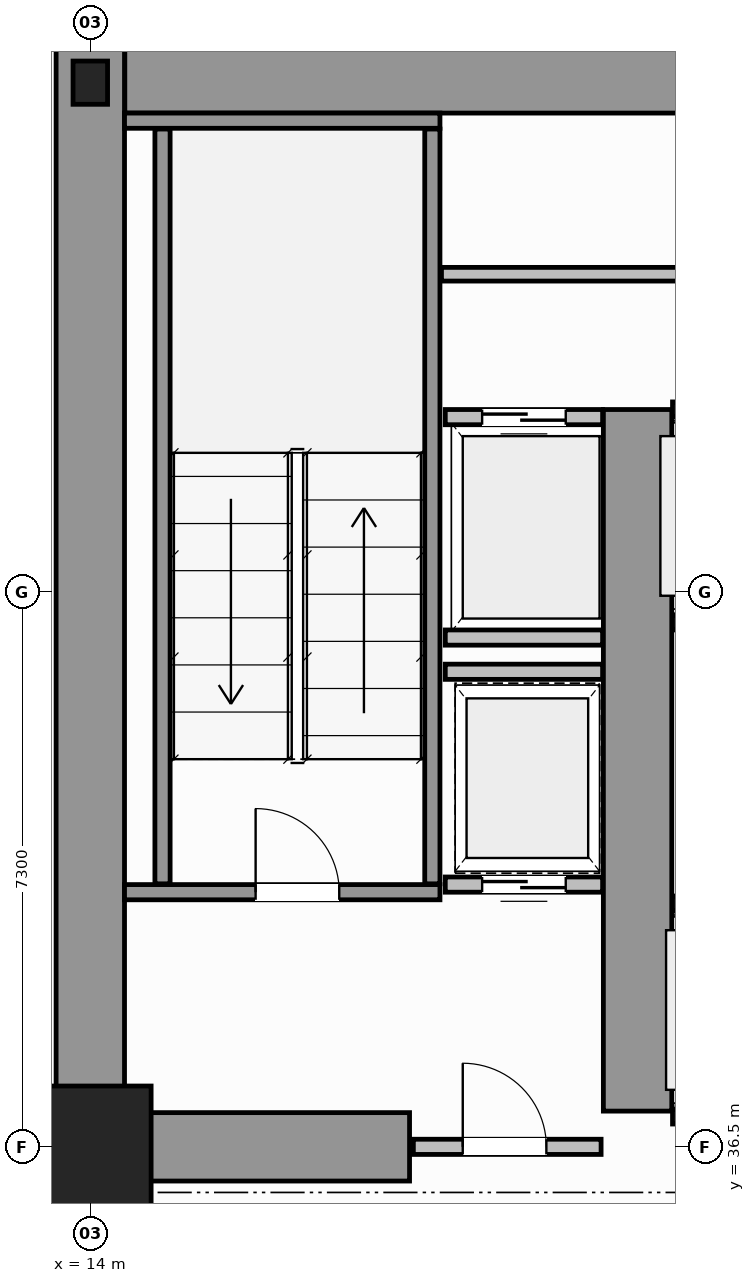
"""IFC4 building model, lengths in metres.
Left out: names, types, materials, properties, quantities, classifications, styles, units other than length and angle.
Written with IfcOpenShell. Run it as: python <this file> out.ifc"""

import sys

from ifc_helpers import new_model, si_unit, direction, frame, frame_2d, origin, origin_2d, place, context, subcontext, project, spatial, rectangle, i_section, extrude, source, transform, mapped, element, fill, save


model = new_model("IFC4")
c1 = context("Model", 3, precision=1e-05, world=origin(), true_north=direction((0.0, 1.0)))
c2 = subcontext(c1, "Body", "Model", "MODEL_VIEW")
j1 = project(units=[si_unit("LENGTHUNIT", "METRE"), si_unit("PLANEANGLEUNIT", "RADIAN")], contexts=[c1])
p1 = place(None, origin())
s1 = spatial("IfcSite", under=j1, at=p1, CompositionType="ELEMENT")
p2 = place(p1, origin())
s2 = spatial("IfcBuilding", under=s1, at=p2, CompositionType="ELEMENT")
p3 = place(p2, frame((0.0, 0.0, 10.0)))
s3 = spatial("IfcBuildingStorey", under=s2, at=p3, CompositionType="ELEMENT", Elevation=10.0)
m1 = source(origin(), c2, "Body", "SweptSolid", [
    extrude(rectangle(XDim=1.6, YDim=1.6, at=origin_2d()), origin(), (0.0, 0.0, 1.0), 4.4),
])
p4 = place(p3, frame((14.0, 36.5, 0.0), z_axis=(0.0, 0.0, 1.0), x_axis=(1.0, 0.0, 0.0)))
e1 = element("IfcColumn", 1, at=p4, inside=s3, PredefinedType="COLUMN", context=c2, shape_type="MappedRepresentation", body=[
    mapped(m1, transform((0.0, 0.0, 0.0), scale=1.0)),
])
m2 = source(origin(), c2, "Body", "SweptSolid", [
    extrude(i_section(OverallWidth=0.454, OverallDepth=0.569, WebThickness=0.078, FlangeThickness=0.08, FilletRadius=0.015, at=origin_2d()), origin(), (0.0, 0.0, 1.0), 4.4),
])
p5 = place(p3, frame((14.0, 50.5, 0.0), z_axis=(0.0, 0.0, 1.0), x_axis=(1.0, 0.0, 0.0)))
e2 = element("IfcColumn", 2, at=p5, inside=s3, PredefinedType="COLUMN", context=c2, shape_type="MappedRepresentation", body=[
    mapped(m2, transform((0.0, 0.0, 0.0), scale=1.0)),
])
p6 = place(p3, frame((14.454, 50.55, 0.0), z_axis=(0.0, 0.0, 1.0), x_axis=(1.0, 0.0, 0.0)))
e3 = element("IfcWall", 3, at=p6, inside=s3, PredefinedType="SHEAR", context=c2, shape_type="SweptSolid", body=[
    extrude(rectangle(XDim=19.544, YDim=0.9, at=frame_2d((9.772, 0.0))), origin(), (0.0, 0.0, 1.0), 4.4),
])
p7 = place(p3, frame((14.0, 36.5, 0.0), z_axis=(0.0, 0.0, 1.0), x_axis=(0.0, 1.0, 0.0)))
e4 = element("IfcWall", 4, at=p7, inside=s3, PredefinedType="SHEAR", context=c2, shape_type="SweptSolid", body=[
    extrude(rectangle(XDim=14.5, YDim=0.9, at=frame_2d((7.25, 0.0))), origin(), (0.0, 0.0, 1.0), 4.4),
])
p8 = place(p3, frame((14.47, 36.5, 0.0), z_axis=(0.0, 0.0, 1.0), x_axis=(1.0, 0.0, 0.0)))
e5 = element("IfcWall", 5, at=p8, inside=s3, PredefinedType="SHEAR", context=c2, shape_type="SweptSolid", body=[
    extrude(rectangle(XDim=3.73, YDim=0.9, at=frame_2d((1.865, 0.0))), origin(), (0.0, 0.0, 1.0), 2.92),
])
p9 = place(p3, frame((21.2, 36.97, 0.0), z_axis=(0.0, 0.0, 1.0), x_axis=(0.0, 1.0, 0.0)))
e6 = element("IfcWall", 6, at=p9, inside=s3, PredefinedType="SHEAR", context=c2, shape_type="SweptSolid", body=[
    extrude(rectangle(XDim=9.23, YDim=0.9, at=frame_2d((4.615, 0.0))), origin(), (0.0, 0.0, 1.0), 4.4),
])
p10 = place(p3, frame((14.45, 39.85, 0.0), z_axis=(0.0, 0.0, 1.0), x_axis=(1.0, 0.0, 0.0)))
e7 = element("IfcWall", 7, at=p10, inside=s3, PredefinedType="SOLIDWALL", context=c2, shape_type="SweptSolid", body=[
    extrude(rectangle(XDim=4.15, YDim=0.2, at=frame_2d((2.075, 0.0))), origin(), (0.0, 0.0, 1.0), 4.4),
])
p11 = place(p10, frame((1.725, 0.0, 0.0)))
e8 = element("IfcOpeningElement", 8, at=p11, cuts=e7, PredefinedType="OPENING", context=c2, shape_type="SweptSolid", body=[
    extrude(rectangle(XDim=1.1, YDim=2.15, at=frame_2d((0.55, 1.075))), frame((0.0, 0.11, 0.0), z_axis=(0.0, -1.0, 0.0), x_axis=(1.0, 0.0, 0.0)), (0.0, 0.0, 1.0), 0.22),
])
p12 = place(p3, frame((14.45, 50.0, 0.0), z_axis=(0.0, 0.0, 1.0), x_axis=(1.0, 0.0, 0.0)))
e9 = element("IfcWall", 9, at=p12, inside=s3, PredefinedType="SOLIDWALL", context=c2, shape_type="SweptSolid", body=[
    extrude(rectangle(XDim=4.15, YDim=0.2, at=frame_2d((2.075, 0.0))), origin(), (0.0, 0.0, 1.0), 4.4),
])
for number, where, z_axis, x_axis in (
    (10, (14.95, 39.96, 0.0), (0.0, 0.0, 1.0), (0.0, 1.0, 0.0)),
    (11, (18.5, 39.96, 0.0), (0.0, 0.0, 1.0), (0.0, 1.0, 0.0)),
):
    element("IfcWall", number, at=place(p3, frame(where, z_axis=z_axis, x_axis=x_axis)), inside=s3, PredefinedType="SOLIDWALL", context=c2, shape_type="SweptSolid", body=[
        extrude(rectangle(XDim=9.93, YDim=0.2, at=frame_2d((4.965, 0.0))), origin(), (0.0, 0.0, 1.0), 4.4),
    ])
p13 = place(p3, frame((18.25, 36.5, 0.0), z_axis=(0.0, 0.0, 1.0), x_axis=(1.0, 0.0, 0.0)))
e12 = element("IfcWall", 12, at=p13, inside=s3, PredefinedType="SOLIDWALL", context=c2, shape_type="SweptSolid", body=[
    extrude(rectangle(XDim=2.47, YDim=0.2, at=frame_2d((1.235, 0.0))), origin(), (0.0, 0.0, 1.0), 2.91),
])
p14 = place(p13, frame((0.65, 0.0, 0.0)))
e13 = element("IfcOpeningElement", 13, at=p14, cuts=e12, PredefinedType="OPENING", context=c2, shape_type="SweptSolid", body=[
    extrude(rectangle(XDim=1.1, YDim=2.15, at=frame_2d((0.55, 1.075))), frame((0.0, 0.11, 0.0), z_axis=(0.0, -1.0, 0.0), x_axis=(1.0, 0.0, 0.0)), (0.0, 0.0, 1.0), 0.22),
])
p15 = place(p3, frame((21.66, 39.7, 0.0), z_axis=(0.0, 0.0, 1.0), x_axis=(1.0, 0.0, 0.0)))
e14 = element("IfcWall", 14, at=p15, inside=s3, PredefinedType="SOLIDWALL", context=c2, shape_type="SweptSolid", body=[
    extrude(rectangle(XDim=1.77, YDim=0.2, at=frame_2d((0.885, 0.0))), origin(), (0.0, 0.0, 1.0), 4.12),
])
p16 = place(p15, frame((0.335, 0.0, 0.0)))
e15 = element("IfcOpeningElement", 15, at=p16, cuts=e14, PredefinedType="OPENING", context=c2, shape_type="SweptSolid", body=[
    extrude(rectangle(XDim=1.1, YDim=2.15, at=frame_2d((0.55, 1.075))), frame((0.0, 0.11, 0.0), z_axis=(0.0, -1.0, 0.0), x_axis=(1.0, 0.0, 0.0)), (0.0, 0.0, 1.0), 0.22),
])
p17 = place(p3, frame((21.66, 36.9, 0.0), z_axis=(0.0, 0.0, 1.0), x_axis=(1.0, 0.0, 0.0)))
e16 = element("IfcWall", 16, at=p17, inside=s3, PredefinedType="SOLIDWALL", context=c2, shape_type="SweptSolid", body=[
    extrude(rectangle(XDim=1.77, YDim=0.2, at=frame_2d((0.885, 0.0))), origin(), (0.0, 0.0, 1.0), 2.91),
])
p18 = place(p3, frame((21.66, 43.4, 0.0), z_axis=(0.0, 0.0, 1.0), x_axis=(1.0, 0.0, 0.0)))
e17 = element("IfcWall", 17, at=p18, inside=s3, PredefinedType="SOLIDWALL", context=c2, shape_type="SweptSolid", body=[
    extrude(rectangle(XDim=1.65, YDim=0.2, at=frame_2d((0.825, 0.0))), origin(), (0.0, 0.0, 1.0), 4.12),
])
p19 = place(p18, frame((0.275, 0.0, 0.0)))
e18 = element("IfcOpeningElement", 18, at=p19, cuts=e17, PredefinedType="OPENING", context=c2, shape_type="SweptSolid", body=[
    extrude(rectangle(XDim=1.1, YDim=2.15, at=frame_2d((0.55, 1.075))), frame((0.0, 0.11, 0.0), z_axis=(0.0, -1.0, 0.0), x_axis=(1.0, 0.0, 0.0)), (0.0, 0.0, 1.0), 0.22),
])
p20 = place(p3, frame((21.66, 46.2, 0.0), z_axis=(0.0, 0.0, 1.0), x_axis=(1.0, 0.0, 0.0)))
e19 = element("IfcWall", 19, at=p20, inside=s3, PredefinedType="SOLIDWALL", context=c2, shape_type="SweptSolid", body=[
    extrude(rectangle(XDim=1.65, YDim=0.2, at=frame_2d((0.825, 0.0))), origin(), (0.0, 0.0, 1.0), 4.12),
])
p21 = place(p3, frame((18.67, 46.1, 0.0), z_axis=(0.0, 0.0, 1.0), x_axis=(1.0, 0.0, 0.0)))
e20 = element("IfcWall", 20, at=p21, inside=s3, PredefinedType="SOLIDWALL", context=c2, shape_type="SweptSolid", body=[
    extrude(rectangle(XDim=2.07, YDim=0.2, at=frame_2d((1.035, 0.0))), origin(), (0.0, 0.0, 1.0), 4.12),
])
p22 = place(p21, frame((0.485, 0.0, 0.0)))
e21 = element("IfcOpeningElement", 21, at=p22, cuts=e20, PredefinedType="OPENING", context=c2, shape_type="SweptSolid", body=[
    extrude(rectangle(XDim=1.1, YDim=2.15, at=frame_2d((0.55, 1.075))), frame((0.0, 0.11, 0.0), z_axis=(0.0, -1.0, 0.0), x_axis=(1.0, 0.0, 0.0)), (0.0, 0.0, 1.0), 0.22),
])
p23 = place(p3, frame((18.67, 43.2, 0.0), z_axis=(0.0, 0.0, 1.0), x_axis=(1.0, 0.0, 0.0)))
e22 = element("IfcWall", 22, at=p23, inside=s3, PredefinedType="SOLIDWALL", context=c2, shape_type="SweptSolid", body=[
    extrude(rectangle(XDim=2.07, YDim=0.2, at=frame_2d((1.035, 0.0))), origin(), (0.0, 0.0, 1.0), 4.12),
])
p24 = place(p3, frame((18.67, 39.95, 0.0), z_axis=(0.0, 0.0, 1.0), x_axis=(1.0, 0.0, 0.0)))
e23 = element("IfcWall", 23, at=p24, inside=s3, PredefinedType="SOLIDWALL", context=c2, shape_type="SweptSolid", body=[
    extrude(rectangle(XDim=2.07, YDim=0.2, at=frame_2d((1.035, 0.0))), origin(), (0.0, 0.0, 1.0), 4.12),
])
p25 = place(p24, frame((0.485, 0.0, 0.0)))
e24 = element("IfcOpeningElement", 24, at=p25, cuts=e23, PredefinedType="OPENING", context=c2, shape_type="SweptSolid", body=[
    extrude(rectangle(XDim=1.1, YDim=2.15, at=frame_2d((0.55, 1.075))), frame((0.0, 0.11, 0.0), z_axis=(0.0, -1.0, 0.0), x_axis=(1.0, 0.0, 0.0)), (0.0, 0.0, 1.0), 0.22),
])
p26 = place(p3, frame((18.67, 42.75, 0.0), z_axis=(0.0, 0.0, 1.0), x_axis=(1.0, 0.0, 0.0)))
e25 = element("IfcWall", 25, at=p26, inside=s3, PredefinedType="SOLIDWALL", context=c2, shape_type="SweptSolid", body=[
    extrude(rectangle(XDim=2.07, YDim=0.2, at=frame_2d((1.035, 0.0))), origin(), (0.0, 0.0, 1.0), 4.12),
])
p27 = place(p3, frame((18.62, 47.98, 0.0), z_axis=(0.0, 0.0, 1.0), x_axis=(1.0, 0.0, 0.0)))
e26 = element("IfcWall", 26, at=p27, inside=s3, PredefinedType="PLUMBINGWALL", context=c2, shape_type="SweptSolid", body=[
    extrude(rectangle(XDim=20.06, YDim=0.18, at=frame_2d((10.03, 0.0))), origin(), (0.0, 0.0, 1.0), 4.12),
])
p28 = place(p27, frame((3.5, 0.0, 0.0)))
e27 = element("IfcOpeningElement", 27, at=p28, cuts=e26, PredefinedType="OPENING", context=c2, shape_type="SweptSolid", body=[
    extrude(rectangle(XDim=0.9, YDim=2.15, at=frame_2d((0.45, 1.075))), frame((0.0, 0.1, 0.0), z_axis=(0.0, -1.0, 0.0), x_axis=(1.0, 0.0, 0.0)), (0.0, 0.0, 1.0), 0.2),
])
p29 = place(p27, frame((10.8, 0.0, 0.0)))
e28 = element("IfcOpeningElement", 28, at=p29, cuts=e26, PredefinedType="OPENING", context=c2, shape_type="SweptSolid", body=[
    extrude(rectangle(XDim=0.9, YDim=2.15, at=frame_2d((0.45, 1.075))), frame((0.0, 0.1, 0.0), z_axis=(0.0, -1.0, 0.0), x_axis=(1.0, 0.0, 0.0)), (0.0, 0.0, 1.0), 0.2),
])
p30 = place(p27, frame((16.8, 0.0, 0.0)))
e29 = element("IfcOpeningElement", 29, at=p30, cuts=e26, PredefinedType="OPENING", context=c2, shape_type="SweptSolid", body=[
    extrude(rectangle(XDim=0.9, YDim=2.15, at=frame_2d((0.45, 1.075))), frame((0.0, 0.1, 0.0), z_axis=(0.0, -1.0, 0.0), x_axis=(1.0, 0.0, 0.0)), (0.0, 0.0, 1.0), 0.2),
])
m3 = source(origin(), c2, "Body", "SweptSolid", [
    extrude(rectangle(XDim=1.1, YDim=2.15, at=frame_2d((0.55, 1.075))), frame((0.0, 0.025, 0.0), z_axis=(0.0, -1.0, 0.0), x_axis=(1.0, 0.0, 0.0)), (0.0, 0.0, 1.0), 0.05),
])
p31 = place(p11, origin())
e30 = element("IfcDoor", 30, at=p31, inside=s3, OperationType="SINGLE_SWING_LEFT", PredefinedType="DOOR", context=c2, shape_type="MappedRepresentation", body=[
    mapped(m3, transform((0.0, 0.0, 0.0), scale=1.0)),
])
fill(e8, e30)
p32 = place(p14, origin())
e31 = element("IfcDoor", 31, at=p32, inside=s3, OperationType="SINGLE_SWING_RIGHT", PredefinedType="DOOR", context=c2, shape_type="MappedRepresentation", body=[
    mapped(m3, transform((0.0, 0.0, 0.0), scale=1.0)),
])
fill(e13, e31)
p33 = place(p22, origin())
e32 = element("IfcDoor", 32, at=p33, inside=s3, OperationType="DOUBLE_DOOR_SLIDING", PredefinedType="DOOR", context=c2, shape_type="MappedRepresentation", body=[
    mapped(m3, transform((0.0, 0.0, 0.0), scale=1.0)),
])
fill(e21, e32)
p34 = place(p25, origin())
e33 = element("IfcDoor", 33, at=p34, inside=s3, OperationType="DOUBLE_DOOR_SLIDING", PredefinedType="DOOR", context=c2, shape_type="MappedRepresentation", body=[
    mapped(m3, transform((0.0, 0.0, 0.0), scale=1.0)),
])
fill(e24, e33)
save(model, sys.argv[1])
